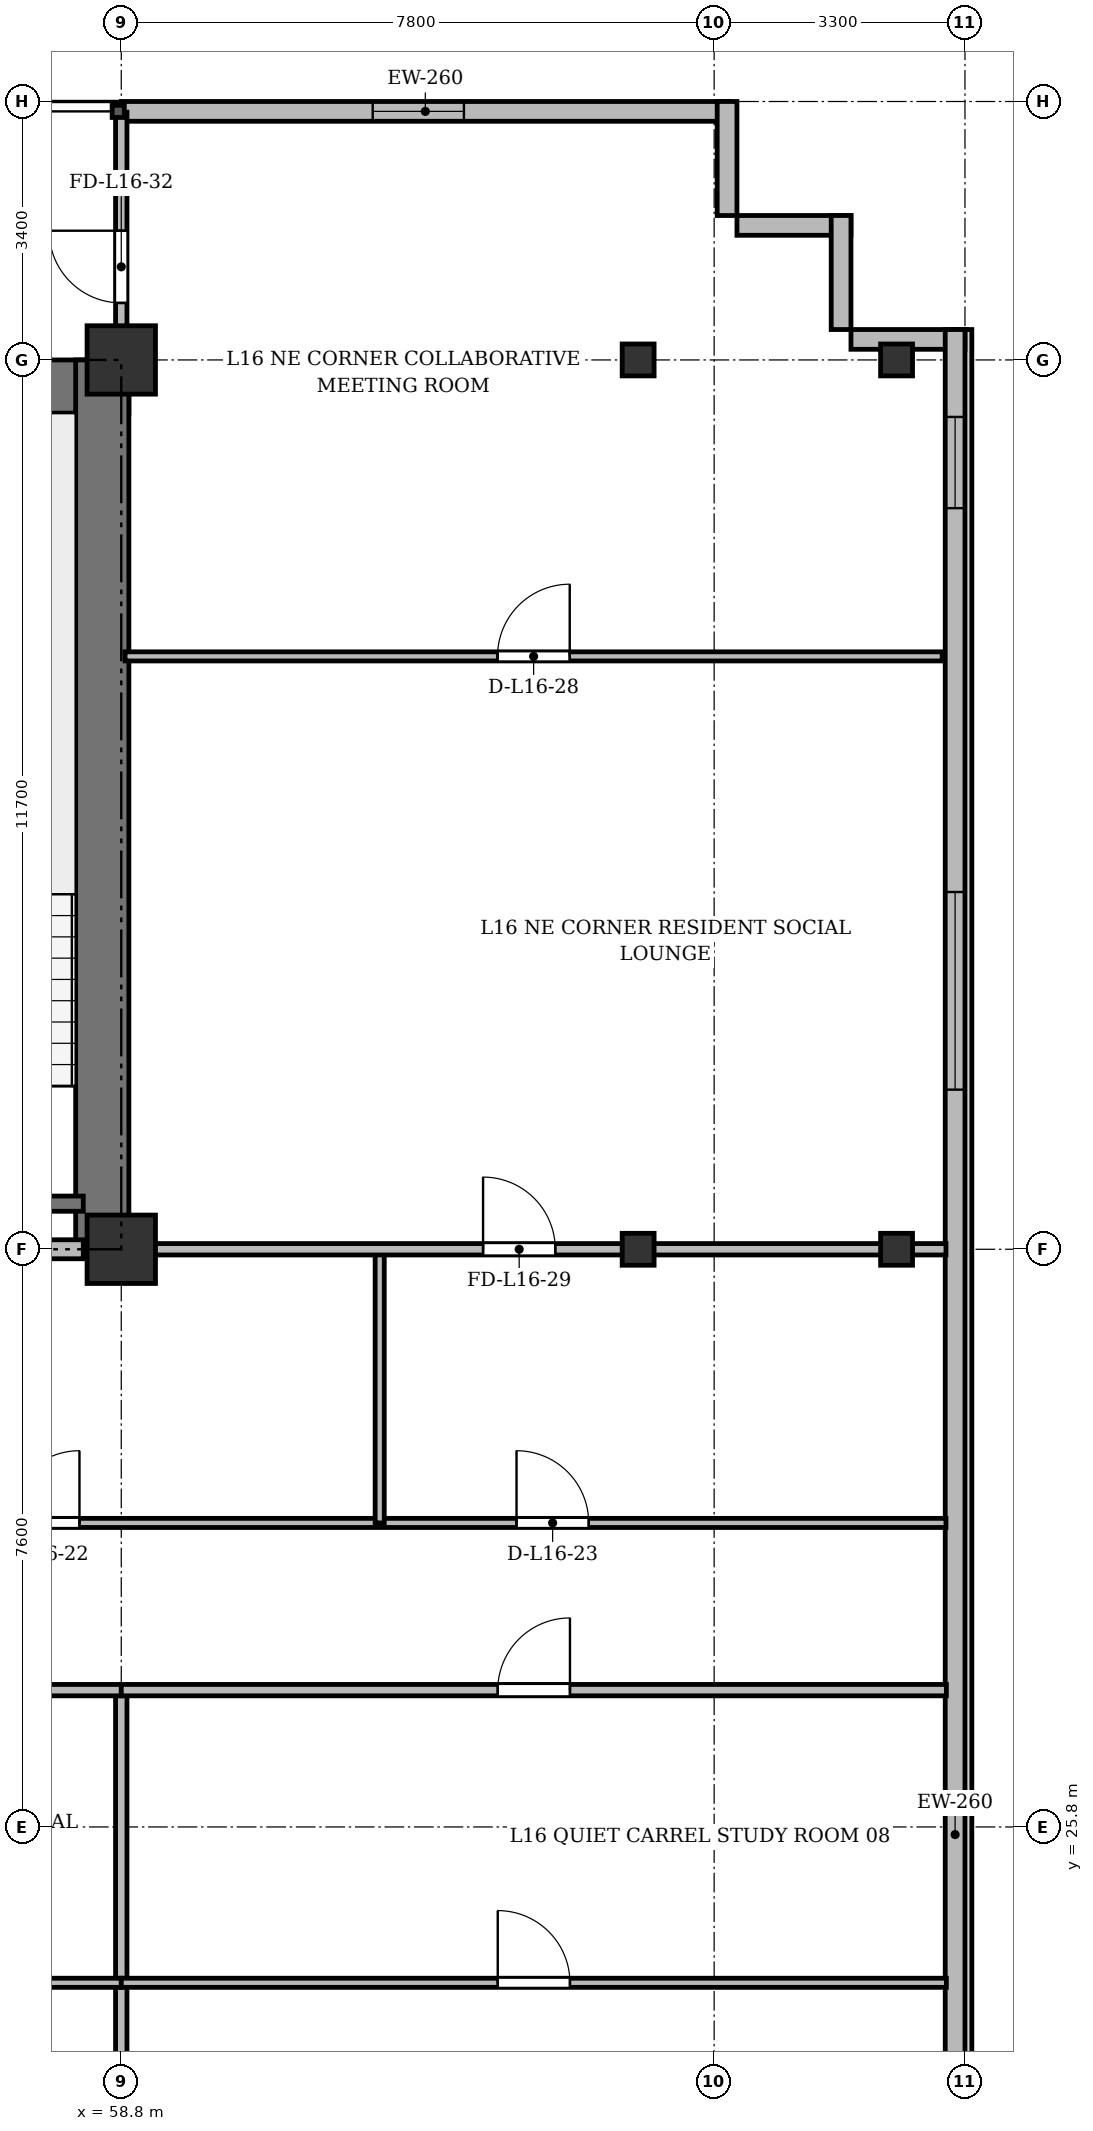
"""IFC4 building model, lengths in metres.
Left out: names, types, materials, properties, quantities, classifications, styles, units other than length and angle.
Written with IfcOpenShell. Run it as: python <this file> out.ifc"""

import sys

from ifc_helpers import new_model, si_unit, direction, frame, frame_2d, origin, origin_2d, place, context, subcontext, project, spatial, rectangle, i_section, extrude, source, transform, mapped, element, fill, save


model = new_model("IFC4")
c1 = context("Model", 3, precision=1e-05, world=origin(), true_north=direction((0.0, 1.0)))
c2 = subcontext(c1, "Body", "Model", "MODEL_VIEW")
j1 = project(units=[si_unit("LENGTHUNIT", "METRE"), si_unit("PLANEANGLEUNIT", "RADIAN")], contexts=[c1])
p1 = place(None, origin())
s1 = spatial("IfcSite", under=j1, at=p1, CompositionType="ELEMENT")
p2 = place(p1, origin())
s2 = spatial("IfcBuilding", under=s1, at=p2, CompositionType="ELEMENT")
p3 = place(p2, frame((0.0, 0.0, 63.1)))
s3 = spatial("IfcBuildingStorey", under=s2, at=p3, CompositionType="ELEMENT", Elevation=63.1)
m1 = source(origin(), c2, "Body", "SweptSolid", [
    extrude(rectangle(XDim=0.9, YDim=0.9, at=origin_2d()), origin(), (0.0, 0.0, 1.0), 3.6),
])
for number, where, z_axis, x_axis in (
    (1, (58.8, 33.4, 0.0), (0.0, 0.0, 1.0), (1.0, 0.0, 0.0)),
    (2, (58.8, 45.1, 0.0), (0.0, 0.0, 1.0), (1.0, 0.0, 0.0)),
):
    element("IfcColumn", number, at=place(p3, frame(where, z_axis=z_axis, x_axis=x_axis)), inside=s3, PredefinedType="COLUMN", context=c2, shape_type="MappedRepresentation", body=[
        mapped(m1, transform((0.0, 0.0, 0.0), x_axis=(1.0, 0.0, 0.0), y_axis=(0.0, 1.0, 0.0), z_axis=(0.0, 0.0, 1.0), scale=1.0)),
    ])
m2 = source(origin(), c2, "Body", "SweptSolid", [
    extrude(i_section(OverallWidth=0.42, OverallDepth=0.42, WebThickness=0.026, FlangeThickness=0.04, at=origin_2d()), origin(), (0.0, 0.0, 1.0), 3.6),
])
for number, where, z_axis, x_axis in (
    (3, (65.6, 33.4, 0.0), (0.0, 0.0, 1.0), (1.0, 0.0, 0.0)),
    (4, (65.6, 45.1, 0.0), (0.0, 0.0, 1.0), (1.0, 0.0, 0.0)),
    (5, (69.0, 33.4, 0.0), (0.0, 0.0, 1.0), (1.0, 0.0, 0.0)),
    (6, (69.0, 45.1, 0.0), (0.0, 0.0, 1.0), (1.0, 0.0, 0.0)),
):
    element("IfcColumn", number, at=place(p3, frame(where, z_axis=z_axis, x_axis=x_axis)), inside=s3, PredefinedType="COLUMN", context=c2, shape_type="MappedRepresentation", body=[
        mapped(m2, transform((0.0, 0.0, 0.0), x_axis=(1.0, 0.0, 0.0), y_axis=(0.0, 1.0, 0.0), z_axis=(0.0, 0.0, 1.0), scale=1.0)),
    ])
p4 = place(p3, frame((58.8, 48.37, 0.0), z_axis=(0.0, 0.0, 1.0), x_axis=(1.0, 0.0, 0.0)))
e7 = element("IfcWall", 7, at=p4, inside=s3, PredefinedType="SOLIDWALL", context=c2, shape_type="SweptSolid", body=[
    extrude(rectangle(XDim=8.0, YDim=0.26, at=frame_2d((4.0, 0.0))), origin(), (0.0, 0.0, 1.0), 3.34),
])
p5 = place(p4, frame((3.308, 0.0, 0.9)))
e8 = element("IfcOpeningElement", 8, at=p5, cuts=e7, PredefinedType="OPENING", context=c2, shape_type="SweptSolid", body=[
    extrude(rectangle(XDim=1.2, YDim=1.65, at=frame_2d((0.6, 0.825))), frame((0.0, 0.14, 0.0), z_axis=(0.0, -1.0, 0.0), x_axis=(1.0, 0.0, 0.0)), (0.0, 0.0, 1.0), 0.28),
])
for number, where, z_axis, x_axis in (
    (9, (66.77, 48.5, 0.0), (0.0, 0.0, 1.0), (0.0, -1.0, 0.0)),
    (10, (66.9, 46.87, 0.0), (0.0, 0.0, 1.0), (1.0, 0.0, 0.0)),
    (11, (68.27, 47.0, 0.0), (0.0, 0.0, 1.0), (0.0, -1.0, 0.0)),
):
    element("IfcWall", number, at=place(p3, frame(where, z_axis=z_axis, x_axis=x_axis)), inside=s3, PredefinedType="SOLIDWALL", context=c2, shape_type="SweptSolid", body=[
        extrude(rectangle(XDim=1.5, YDim=0.26, at=frame_2d((0.75, 0.0))), origin(), (0.0, 0.0, 1.0), 3.34),
    ])
p6 = place(p3, frame((68.4, 45.37, 0.0), z_axis=(0.0, 0.0, 1.0), x_axis=(1.0, 0.0, 0.0)))
e12 = element("IfcWall", 12, at=p6, inside=s3, PredefinedType="SOLIDWALL", context=c2, shape_type="SweptSolid", body=[
    extrude(rectangle(XDim=1.5, YDim=0.26, at=frame_2d((0.75, 0.0))), origin(), (0.0, 0.0, 1.0), 2.69),
])
p7 = place(p3, frame((69.77, 45.5, 0.0), z_axis=(0.0, 0.0, 1.0), x_axis=(0.0, -1.0, 0.0)))
e13 = element("IfcWall", 13, at=p7, inside=s3, PredefinedType="SOLIDWALL", context=c2, shape_type="SweptSolid", body=[
    extrude(rectangle(XDim=39.6, YDim=0.26, at=frame_2d((19.8, 0.0))), origin(), (0.0, 0.0, 1.0), 3.34),
])
p8 = place(p7, frame((36.95, 0.0, 0.92)))
e14 = element("IfcOpeningElement", 14, at=p8, cuts=e13, PredefinedType="OPENING", context=c2, shape_type="SweptSolid", body=[
    extrude(rectangle(XDim=1.2, YDim=1.65, at=frame_2d((0.6, 0.825))), frame((0.0, 0.14, 0.0), z_axis=(0.0, -1.0, 0.0), x_axis=(1.0, 0.0, 0.0)), (0.0, 0.0, 1.0), 0.28),
])
p9 = place(p7, frame((32.8, 0.0, 0.92)))
e15 = element("IfcOpeningElement", 15, at=p9, cuts=e13, PredefinedType="OPENING", context=c2, shape_type="SweptSolid", body=[
    extrude(rectangle(XDim=2.6, YDim=1.9, at=frame_2d((1.3, 0.95))), frame((0.0, 0.14, 0.0), z_axis=(0.0, -1.0, 0.0), x_axis=(1.0, 0.0, 0.0)), (0.0, 0.0, 1.0), 0.28),
])
p10 = place(p7, frame((28.6, 0.0, 0.92)))
e16 = element("IfcOpeningElement", 16, at=p10, cuts=e13, PredefinedType="OPENING", context=c2, shape_type="SweptSolid", body=[
    extrude(rectangle(XDim=2.6, YDim=1.9, at=frame_2d((1.3, 0.95))), frame((0.0, 0.14, 0.0), z_axis=(0.0, -1.0, 0.0), x_axis=(1.0, 0.0, 0.0)), (0.0, 0.0, 1.0), 0.28),
])
p11 = place(p7, frame((7.4, 0.0, 0.92)))
e17 = element("IfcOpeningElement", 17, at=p11, cuts=e13, PredefinedType="OPENING", context=c2, shape_type="SweptSolid", body=[
    extrude(rectangle(XDim=2.6, YDim=1.9, at=frame_2d((1.3, 0.95))), frame((0.0, 0.14, 0.0), z_axis=(0.0, -1.0, 0.0), x_axis=(1.0, 0.0, 0.0)), (0.0, 0.0, 1.0), 0.28),
])
p12 = place(p7, frame((1.15, 0.0, 0.92)))
e18 = element("IfcOpeningElement", 18, at=p12, cuts=e13, PredefinedType="OPENING", context=c2, shape_type="SweptSolid", body=[
    extrude(rectangle(XDim=1.2, YDim=1.65, at=frame_2d((0.6, 0.825))), frame((0.0, 0.14, 0.0), z_axis=(0.0, -1.0, 0.0), x_axis=(1.0, 0.0, 0.0)), (0.0, 0.0, 1.0), 0.28),
])
p13 = place(p3, frame((15.5, 44.75, 0.0), z_axis=(0.0, 0.0, 1.0), x_axis=(1.0, 0.0, 0.0)))
e19 = element("IfcWall", 19, at=p13, inside=s3, PredefinedType="SHEAR", context=c2, shape_type="SweptSolid", body=[
    extrude(rectangle(XDim=43.4, YDim=0.7, at=frame_2d((21.7, 0.0))), origin(), (0.0, 0.0, 1.0), 3.34),
])
p14 = place(p3, frame((58.55, 33.4, 0.0), z_axis=(0.0, 0.0, 1.0), x_axis=(0.0, 1.0, 0.0)))
e20 = element("IfcWall", 20, at=p14, inside=s3, PredefinedType="SHEAR", context=c2, shape_type="SweptSolid", body=[
    extrude(rectangle(XDim=11.7, YDim=0.7, at=frame_2d((5.85, 0.0))), origin(), (0.0, 0.0, 1.0), 3.34),
])
p15 = place(p3, frame((54.9, 34.0, 0.0), z_axis=(0.0, 0.0, 1.0), x_axis=(1.0, 0.0, 0.0)))
e21 = element("IfcWall", 21, at=p15, inside=s3, PredefinedType="SHEAR", context=c2, shape_type="SweptSolid", body=[
    extrude(rectangle(XDim=3.4, YDim=0.2, at=frame_2d((1.7, 0.0))), origin(), (0.0, 0.0, 1.0), 3.34),
])
p16 = place(p3, frame((47.15, 33.4, 0.0), z_axis=(0.0, 0.0, 1.0), x_axis=(1.0, 0.0, 0.0)))
e22 = element("IfcWall", 22, at=p16, inside=s3, PredefinedType="PARTITIONING", context=c2, shape_type="SweptSolid", body=[
    extrude(rectangle(XDim=11.15, YDim=0.25, at=frame_2d((5.575, 0.0))), origin(), (0.0, 0.0, 1.0), 2.69),
])
p17 = place(p16, frame((0.7, 0.0, 0.0)))
e23 = element("IfcOpeningElement", 23, at=p17, cuts=e22, PredefinedType="OPENING", context=c2, shape_type="SweptSolid", body=[
    extrude(rectangle(XDim=0.95, YDim=2.15, at=frame_2d((0.475, 1.075))), frame((0.0, 0.135, 0.0), z_axis=(0.0, -1.0, 0.0), x_axis=(1.0, 0.0, 0.0)), (0.0, 0.0, 1.0), 0.27),
])
p18 = place(p16, frame((6.0, 0.0, 0.0)))
e24 = element("IfcOpeningElement", 24, at=p18, cuts=e22, PredefinedType="OPENING", context=c2, shape_type="SweptSolid", body=[
    extrude(rectangle(XDim=1.2, YDim=2.15, at=frame_2d((0.6, 1.075))), frame((0.0, 0.135, 0.0), z_axis=(0.0, -1.0, 0.0), x_axis=(1.0, 0.0, 0.0)), (0.0, 0.0, 1.0), 0.27),
])
p19 = place(p3, frame((54.8, 29.8, 0.0), z_axis=(0.0, 0.0, 1.0), x_axis=(1.0, 0.0, 0.0)))
e25 = element("IfcWall", 25, at=p19, inside=s3, PredefinedType="PARTITIONING", context=c2, shape_type="SweptSolid", body=[
    extrude(rectangle(XDim=14.85, YDim=0.12, at=frame_2d((7.425, 0.0))), origin(), (0.0, 0.0, 1.0), 2.752),
])
p20 = place(p19, frame((2.5, 0.0, 0.0)))
e26 = element("IfcOpeningElement", 26, at=p20, cuts=e25, PredefinedType="OPENING", context=c2, shape_type="SweptSolid", body=[
    extrude(rectangle(XDim=0.95, YDim=2.15, at=frame_2d((0.475, 1.075))), frame((0.0, 0.07, 0.0), z_axis=(0.0, -1.0, 0.0), x_axis=(1.0, 0.0, 0.0)), (0.0, 0.0, 1.0), 0.14),
])
p21 = place(p19, frame((9.2, 0.0, 0.0)))
e27 = element("IfcOpeningElement", 27, at=p21, cuts=e25, PredefinedType="OPENING", context=c2, shape_type="SweptSolid", body=[
    extrude(rectangle(XDim=0.95, YDim=2.15, at=frame_2d((0.475, 1.075))), frame((0.0, 0.07, 0.0), z_axis=(0.0, -1.0, 0.0), x_axis=(1.0, 0.0, 0.0)), (0.0, 0.0, 1.0), 0.14),
])
p22 = place(p3, frame((62.2, 29.8, 0.0), z_axis=(0.0, 0.0, 1.0), x_axis=(0.0, 1.0, 0.0)))
e28 = element("IfcWall", 28, at=p22, inside=s3, PredefinedType="PARTITIONING", context=c2, shape_type="SweptSolid", body=[
    extrude(rectangle(XDim=3.6, YDim=0.12, at=frame_2d((1.8, 0.0))), origin(), (0.0, 0.0, 1.0), 2.69),
])
p23 = place(p3, frame((58.85, 41.2, 0.0), z_axis=(0.0, 0.0, 1.0), x_axis=(1.0, 0.0, 0.0)))
e29 = element("IfcWall", 29, at=p23, inside=s3, PredefinedType="PARTITIONING", context=c2, shape_type="SweptSolid", body=[
    extrude(rectangle(XDim=10.75, YDim=0.12, at=frame_2d((5.375, 0.0))), origin(), (0.0, 0.0, 1.0), 2.752),
])
p24 = place(p23, frame((4.9, 0.0, 0.0)))
e30 = element("IfcOpeningElement", 30, at=p24, cuts=e29, PredefinedType="OPENING", context=c2, shape_type="SweptSolid", body=[
    extrude(rectangle(XDim=0.95, YDim=2.15, at=frame_2d((0.475, 1.075))), frame((0.0, 0.07, 0.0), z_axis=(0.0, -1.0, 0.0), x_axis=(1.0, 0.0, 0.0)), (0.0, 0.0, 1.0), 0.14),
])
p25 = place(p3, frame((58.8, 33.4, 0.0), z_axis=(0.0, 0.0, 1.0), x_axis=(1.0, 0.0, 0.0)))
e31 = element("IfcWall", 31, at=p25, inside=s3, PredefinedType="PARTITIONING", context=c2, shape_type="SweptSolid", body=[
    extrude(rectangle(XDim=10.85, YDim=0.15, at=frame_2d((5.425, 0.0))), origin(), (0.0, 0.0, 1.0), 2.69),
])
p26 = place(p25, frame((4.76, 0.0, 0.0)))
e32 = element("IfcOpeningElement", 32, at=p26, cuts=e31, PredefinedType="OPENING", context=c2, shape_type="SweptSolid", body=[
    extrude(rectangle(XDim=0.95, YDim=2.15, at=frame_2d((0.475, 1.075))), frame((0.0, 0.085, 0.0), z_axis=(0.0, -1.0, 0.0), x_axis=(1.0, 0.0, 0.0)), (0.0, 0.0, 1.0), 0.17),
])
p27 = place(p3, frame((58.8, 44.75, 0.0), z_axis=(0.0, 0.0, 1.0), x_axis=(0.0, 1.0, 0.0)))
e33 = element("IfcWall", 33, at=p27, inside=s3, PredefinedType="PARTITIONING", context=c2, shape_type="SweptSolid", body=[
    extrude(rectangle(XDim=3.61, YDim=0.15, at=frame_2d((1.805, 0.0))), origin(), (0.0, 0.0, 1.0), 2.752),
])
p28 = place(p27, frame((1.1, 0.0, 0.0)))
e34 = element("IfcOpeningElement", 34, at=p28, cuts=e33, PredefinedType="OPENING", context=c2, shape_type="SweptSolid", body=[
    extrude(rectangle(XDim=0.95, YDim=2.15, at=frame_2d((0.475, 1.075))), frame((0.0, 0.085, 0.0), z_axis=(0.0, -1.0, 0.0), x_axis=(1.0, 0.0, 0.0)), (0.0, 0.0, 1.0), 0.17),
])
p29 = place(p3, frame((58.8, 3.145, 0.0), z_axis=(0.0, 0.0, 1.0), x_axis=(0.0, 1.0, 0.0)))
e35 = element("IfcWall", 35, at=p29, inside=s3, PredefinedType="PARTITIONING", context=c2, shape_type="SweptSolid", body=[
    extrude(rectangle(XDim=24.455, YDim=0.15, at=frame_2d((12.228, 0.0))), origin(), (0.0, 0.0, 1.0), 2.752),
])
p30 = place(p3, frame((51.0, 27.6, 0.0), z_axis=(0.0, 0.0, 1.0), x_axis=(1.0, 0.0, 0.0)))
e36 = element("IfcWall", 36, at=p30, inside=s3, PredefinedType="PARTITIONING", context=c2, shape_type="SweptSolid", body=[
    extrude(rectangle(XDim=7.8, YDim=0.15, at=frame_2d((3.9, 0.0))), origin(), (0.0, 0.0, 1.0), 2.752),
])
p31 = place(p30, frame((3.333, 0.0, 0.0)))
e37 = element("IfcOpeningElement", 37, at=p31, cuts=e36, PredefinedType="OPENING", context=c2, shape_type="SweptSolid", body=[
    extrude(rectangle(XDim=0.95, YDim=2.15, at=frame_2d((0.475, 1.075))), frame((0.0, 0.085, 0.0), z_axis=(0.0, -1.0, 0.0), x_axis=(1.0, 0.0, 0.0)), (0.0, 0.0, 1.0), 0.17),
])
p32 = place(p3, frame((51.0, 23.75, 0.0), z_axis=(0.0, 0.0, 1.0), x_axis=(1.0, 0.0, 0.0)))
e38 = element("IfcWall", 38, at=p32, inside=s3, PredefinedType="PARTITIONING", context=c2, shape_type="SweptSolid", body=[
    extrude(rectangle(XDim=7.8, YDim=0.12, at=frame_2d((3.9, 0.0))), origin(), (0.0, 0.0, 1.0), 2.752),
])
p33 = place(p32, frame((3.333, 0.0, 0.0)))
e39 = element("IfcOpeningElement", 39, at=p33, cuts=e38, PredefinedType="OPENING", context=c2, shape_type="SweptSolid", body=[
    extrude(rectangle(XDim=0.95, YDim=2.15, at=frame_2d((0.475, 1.075))), frame((0.0, 0.07, 0.0), z_axis=(0.0, -1.0, 0.0), x_axis=(1.0, 0.0, 0.0)), (0.0, 0.0, 1.0), 0.14),
])
p34 = place(p3, frame((58.8, 27.6, 0.0), z_axis=(0.0, 0.0, 1.0), x_axis=(1.0, 0.0, 0.0)))
e40 = element("IfcWall", 40, at=p34, inside=s3, PredefinedType="PARTITIONING", context=c2, shape_type="SweptSolid", body=[
    extrude(rectangle(XDim=10.855, YDim=0.15, at=frame_2d((5.427, 0.0))), origin(), (0.0, 0.0, 1.0), 2.752),
])
p35 = place(p34, frame((4.953, 0.0, 0.0)))
e41 = element("IfcOpeningElement", 41, at=p35, cuts=e40, PredefinedType="OPENING", context=c2, shape_type="SweptSolid", body=[
    extrude(rectangle(XDim=0.95, YDim=2.15, at=frame_2d((0.475, 1.075))), frame((0.0, 0.085, 0.0), z_axis=(0.0, -1.0, 0.0), x_axis=(1.0, 0.0, 0.0)), (0.0, 0.0, 1.0), 0.17),
])
p36 = place(p3, frame((58.8, 23.75, 0.0), z_axis=(0.0, 0.0, 1.0), x_axis=(1.0, 0.0, 0.0)))
e42 = element("IfcWall", 42, at=p36, inside=s3, PredefinedType="PARTITIONING", context=c2, shape_type="SweptSolid", body=[
    extrude(rectangle(XDim=10.855, YDim=0.12, at=frame_2d((5.427, 0.0))), origin(), (0.0, 0.0, 1.0), 2.752),
])
p37 = place(p36, frame((4.953, 0.0, 0.0)))
e43 = element("IfcOpeningElement", 43, at=p37, cuts=e42, PredefinedType="OPENING", context=c2, shape_type="SweptSolid", body=[
    extrude(rectangle(XDim=0.95, YDim=2.15, at=frame_2d((0.475, 1.075))), frame((0.0, 0.07, 0.0), z_axis=(0.0, -1.0, 0.0), x_axis=(1.0, 0.0, 0.0)), (0.0, 0.0, 1.0), 0.14),
])
m3 = source(origin(), c2, "Body", "SweptSolid", [
    extrude(rectangle(XDim=1.2, YDim=1.65, at=frame_2d((0.6, 0.825))), frame((0.0, 0.03, 0.0), z_axis=(0.0, -1.0, 0.0), x_axis=(1.0, 0.0, 0.0)), (0.0, 0.0, 1.0), 0.06),
])
p38 = place(p5, origin())
e44 = element("IfcWindow", 44, at=p38, inside=s3, PartitioningType="SINGLE_PANEL", PredefinedType="WINDOW", context=c2, shape_type="MappedRepresentation", body=[
    mapped(m3, transform((0.0, 0.0, 0.0), x_axis=(1.0, 0.0, 0.0), y_axis=(0.0, 1.0, 0.0), z_axis=(0.0, 0.0, 1.0), scale=1.0)),
])
fill(e8, e44)
m4 = source(origin(), c2, "Body", "SweptSolid", [
    extrude(rectangle(XDim=2.6, YDim=1.9, at=frame_2d((1.3, 0.95))), frame((0.0, 0.03, 0.0), z_axis=(0.0, -1.0, 0.0), x_axis=(1.0, 0.0, 0.0)), (0.0, 0.0, 1.0), 0.06),
])
p39 = place(p11, origin())
e45 = element("IfcWindow", 45, at=p39, inside=s3, PartitioningType="SINGLE_PANEL", PredefinedType="WINDOW", context=c2, shape_type="MappedRepresentation", body=[
    mapped(m4, transform((0.0, 0.0, 0.0), x_axis=(1.0, 0.0, 0.0), y_axis=(0.0, 1.0, 0.0), z_axis=(0.0, 0.0, 1.0), scale=1.0)),
])
fill(e17, e45)
p40 = place(p12, origin())
e46 = element("IfcWindow", 46, at=p40, inside=s3, PartitioningType="SINGLE_PANEL", PredefinedType="WINDOW", context=c2, shape_type="MappedRepresentation", body=[
    mapped(m3, transform((0.0, 0.0, 0.0), x_axis=(1.0, 0.0, 0.0), y_axis=(0.0, 1.0, 0.0), z_axis=(0.0, 0.0, 1.0), scale=1.0)),
])
fill(e18, e46)
m5 = source(origin(), c2, "Body", "SweptSolid", [
    extrude(rectangle(XDim=0.95, YDim=2.15, at=frame_2d((0.475, 1.075))), frame((0.0, 0.025, 0.0), z_axis=(0.0, -1.0, 0.0), x_axis=(1.0, 0.0, 0.0)), (0.0, 0.0, 1.0), 0.05),
])
p41 = place(p20, origin())
e47 = element("IfcDoor", 47, at=p41, inside=s3, OperationType="SINGLE_SWING_RIGHT", PredefinedType="DOOR", context=c2, shape_type="MappedRepresentation", body=[
    mapped(m5, transform((0.0, 0.0, 0.0), x_axis=(1.0, 0.0, 0.0), y_axis=(0.0, 1.0, 0.0), z_axis=(0.0, 0.0, 1.0), scale=1.0)),
])
fill(e26, e47)
p42 = place(p21, origin())
e48 = element("IfcDoor", 48, at=p42, inside=s3, OperationType="SINGLE_SWING_LEFT", PredefinedType="DOOR", context=c2, shape_type="MappedRepresentation", body=[
    mapped(m5, transform((0.0, 0.0, 0.0), x_axis=(1.0, 0.0, 0.0), y_axis=(0.0, 1.0, 0.0), z_axis=(0.0, 0.0, 1.0), scale=1.0)),
])
fill(e27, e48)
p43 = place(p24, origin())
e49 = element("IfcDoor", 49, at=p43, inside=s3, OperationType="SINGLE_SWING_RIGHT", PredefinedType="DOOR", context=c2, shape_type="MappedRepresentation", body=[
    mapped(m5, transform((0.0, 0.0, 0.0), x_axis=(1.0, 0.0, 0.0), y_axis=(0.0, 1.0, 0.0), z_axis=(0.0, 0.0, 1.0), scale=1.0)),
])
fill(e30, e49)
p44 = place(p26, origin())
e50 = element("IfcDoor", 50, at=p44, inside=s3, OperationType="SINGLE_SWING_LEFT", PredefinedType="DOOR", context=c2, shape_type="MappedRepresentation", body=[
    mapped(m5, transform((0.0, 0.0, 0.0), x_axis=(1.0, 0.0, 0.0), y_axis=(0.0, 1.0, 0.0), z_axis=(0.0, 0.0, 1.0), scale=1.0)),
])
fill(e32, e50)
p45 = place(p28, origin())
e51 = element("IfcDoor", 51, at=p45, inside=s3, OperationType="SINGLE_SWING_RIGHT", PredefinedType="DOOR", context=c2, shape_type="MappedRepresentation", body=[
    mapped(m5, transform((0.0, 0.0, 0.0), x_axis=(1.0, 0.0, 0.0), y_axis=(0.0, 1.0, 0.0), z_axis=(0.0, 0.0, 1.0), scale=1.0)),
])
fill(e34, e51)
p46 = place(p35, origin())
e52 = element("IfcDoor", 52, at=p46, inside=s3, OperationType="SINGLE_SWING_RIGHT", PredefinedType="DOOR", context=c2, shape_type="MappedRepresentation", body=[
    mapped(m5, transform((0.0, 0.0, 0.0), x_axis=(1.0, 0.0, 0.0), y_axis=(0.0, 1.0, 0.0), z_axis=(0.0, 0.0, 1.0), scale=1.0)),
])
fill(e41, e52)
p47 = place(p37, origin())
e53 = element("IfcDoor", 53, at=p47, inside=s3, OperationType="SINGLE_SWING_LEFT", PredefinedType="DOOR", context=c2, shape_type="MappedRepresentation", body=[
    mapped(m5, transform((0.0, 0.0, 0.0), x_axis=(1.0, 0.0, 0.0), y_axis=(0.0, 1.0, 0.0), z_axis=(0.0, 0.0, 1.0), scale=1.0)),
])
fill(e43, e53)
save(model, sys.argv[1])
